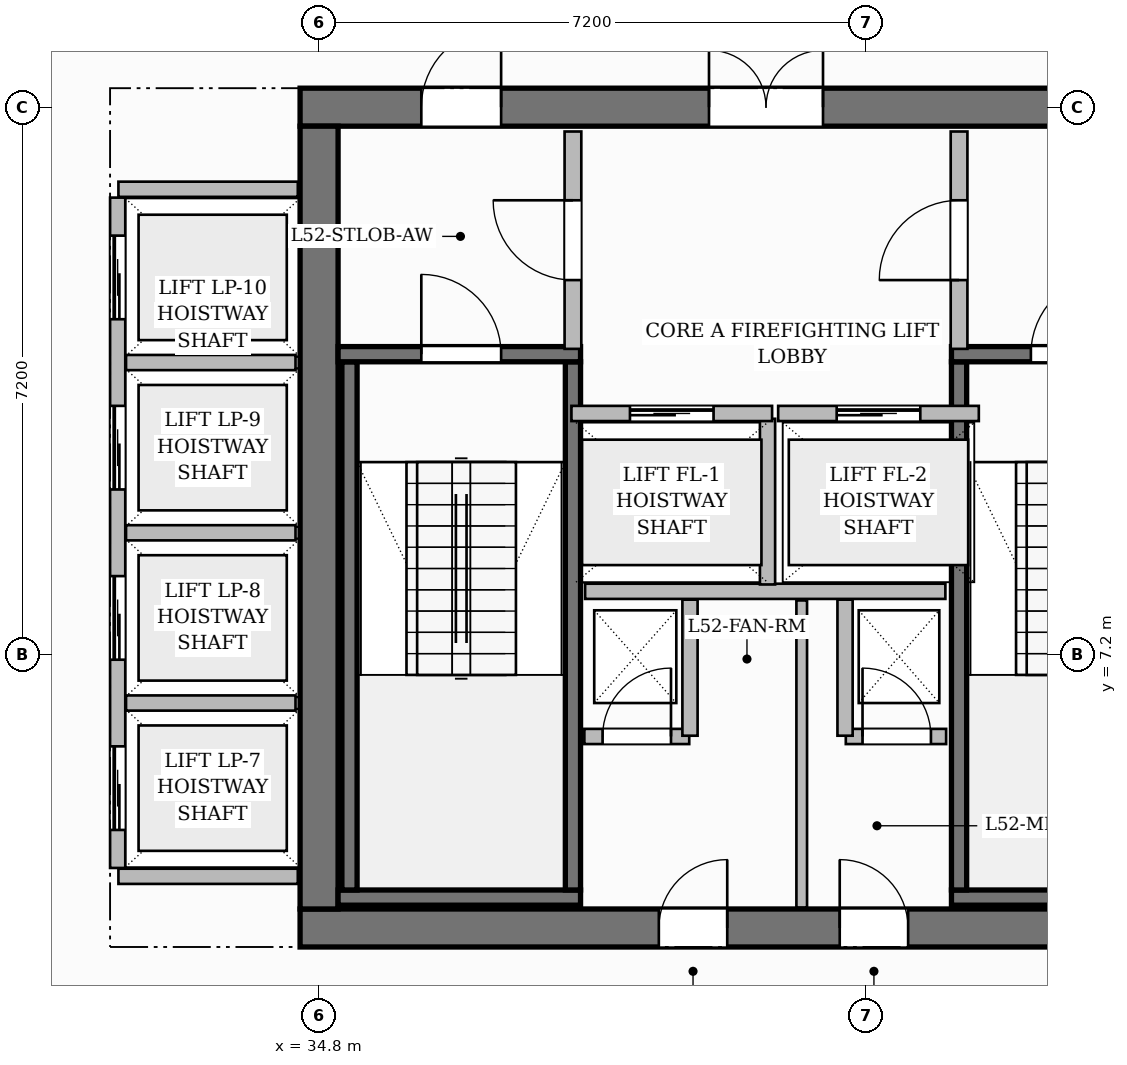
"""IFC4 building model, lengths in metres.
Left out: names, types, materials, properties, quantities, classifications, styles, units other than length and angle.
Written with IfcOpenShell. Run it as: python <this file> out.ifc"""

import sys

from ifc_helpers import new_model, si_unit, direction, frame, frame_2d, origin, place, context, subcontext, project, spatial, rectangle, extrude, source, transform, mapped, element, fill, save


model = new_model("IFC4")
c1 = context("Model", 3, precision=1e-05, world=origin(), true_north=direction((0.0, 1.0)))
c2 = subcontext(c1, "Body", "Model", "MODEL_VIEW")
j1 = project(units=[si_unit("LENGTHUNIT", "METRE"), si_unit("PLANEANGLEUNIT", "RADIAN")], contexts=[c1])
p1 = place(None, origin())
s1 = spatial("IfcSite", under=j1, at=p1, CompositionType="ELEMENT")
p2 = place(p1, origin())
s2 = spatial("IfcBuilding", under=s1, at=p2, CompositionType="ELEMENT")
p3 = place(p2, frame((0.0, 0.0, 209.6)))
s3 = spatial("IfcBuildingStorey", under=s2, at=p3, CompositionType="ELEMENT", Elevation=209.6)
p4 = place(p3, frame((34.55, 3.6, 0.0), z_axis=(0.0, 0.0, 1.0), x_axis=(1.0, 0.0, 0.0)))
e1 = element("IfcWall", 1, at=p4, inside=s3, PredefinedType="SHEAR", context=c2, shape_type="SweptSolid", body=[
    extrude(rectangle(XDim=15.5, YDim=0.5, at=frame_2d((7.75, 0.0))), origin(), (0.0, 0.0, 1.0), 3.85),
])
p5 = place(p4, frame((4.72, 0.0, 0.0)))
e2 = element("IfcOpeningElement", 2, at=p5, cuts=e1, PredefinedType="OPENING", context=c2, shape_type="SweptSolid", body=[
    extrude(rectangle(XDim=0.9, YDim=2.1, at=frame_2d((0.45, 1.05))), frame((0.0, 0.26, 0.0), z_axis=(0.0, -1.0, 0.0), x_axis=(1.0, 0.0, 0.0)), (0.0, 0.0, 1.0), 0.52),
])
p6 = place(p4, frame((7.1, 0.0, 0.0)))
e3 = element("IfcOpeningElement", 3, at=p6, cuts=e1, PredefinedType="OPENING", context=c2, shape_type="SweptSolid", body=[
    extrude(rectangle(XDim=0.9, YDim=2.1, at=frame_2d((0.45, 1.05))), frame((0.0, 0.26, 0.0), z_axis=(0.0, -1.0, 0.0), x_axis=(1.0, 0.0, 0.0)), (0.0, 0.0, 1.0), 0.52),
])
p7 = place(p3, frame((34.55, 14.4, 0.0), z_axis=(0.0, 0.0, 1.0), x_axis=(1.0, 0.0, 0.0)))
e4 = element("IfcWall", 4, at=p7, inside=s3, PredefinedType="SHEAR", context=c2, shape_type="SweptSolid", body=[
    extrude(rectangle(XDim=15.5, YDim=0.5, at=frame_2d((7.75, 0.0))), origin(), (0.0, 0.0, 1.0), 3.85),
])
p8 = place(p7, frame((5.38, 0.0, 0.0)))
e5 = element("IfcOpeningElement", 5, at=p8, cuts=e4, PredefinedType="OPENING", context=c2, shape_type="SweptSolid", body=[
    extrude(rectangle(XDim=1.5, YDim=2.2, at=frame_2d((0.75, 1.1))), frame((0.0, 0.26, 0.0), z_axis=(0.0, -1.0, 0.0), x_axis=(1.0, 0.0, 0.0)), (0.0, 0.0, 1.0), 0.52),
])
p9 = place(p7, frame((1.595, 0.0, 0.0)))
e6 = element("IfcOpeningElement", 6, at=p9, cuts=e4, PredefinedType="OPENING", context=c2, shape_type="SweptSolid", body=[
    extrude(rectangle(XDim=1.05, YDim=2.15, at=frame_2d((0.525, 1.075))), frame((0.0, 0.26, 0.0), z_axis=(0.0, -1.0, 0.0), x_axis=(1.0, 0.0, 0.0)), (0.0, 0.0, 1.0), 0.52),
])
p10 = place(p7, frame((11.225, 0.0, 0.0)))
e7 = element("IfcOpeningElement", 7, at=p10, cuts=e4, PredefinedType="OPENING", context=c2, shape_type="SweptSolid", body=[
    extrude(rectangle(XDim=1.05, YDim=2.15, at=frame_2d((0.525, 1.075))), frame((0.0, 0.26, 0.0), z_axis=(0.0, -1.0, 0.0), x_axis=(1.0, 0.0, 0.0)), (0.0, 0.0, 1.0), 0.52),
])
p11 = place(p3, frame((34.8, 3.85, 0.0), z_axis=(0.0, 0.0, 1.0), x_axis=(0.0, 1.0, 0.0)))
e8 = element("IfcWall", 8, at=p11, inside=s3, PredefinedType="SHEAR", context=c2, shape_type="SweptSolid", body=[
    extrude(rectangle(XDim=10.3, YDim=0.5, at=frame_2d((5.15, 0.0))), origin(), (0.0, 0.0, 1.0), 3.85),
])
p12 = place(p3, frame((35.05, 4.0, 0.0), z_axis=(0.0, 0.0, 1.0), x_axis=(1.0, 0.0, 0.0)))
e9 = element("IfcWall", 9, at=p12, inside=s3, PredefinedType="SHEAR", context=c2, shape_type="SweptSolid", body=[
    extrude(rectangle(XDim=3.19, YDim=0.2, at=frame_2d((1.595, 0.0))), origin(), (0.0, 0.0, 1.0), 3.85),
])
for number, where, z_axis, x_axis in (
    (10, (35.2, 4.1, 0.0), (0.0, 0.0, 1.0), (0.0, 1.0, 0.0)),
    (11, (38.14, 4.1, 0.0), (0.0, 0.0, 1.0), (0.0, 1.0, 0.0)),
):
    element("IfcWall", number, at=place(p3, frame(where, z_axis=z_axis, x_axis=x_axis)), inside=s3, PredefinedType="SHEAR", context=c2, shape_type="SweptSolid", body=[
        extrude(rectangle(XDim=6.95, YDim=0.2, at=frame_2d((3.475, 0.0))), origin(), (0.0, 0.0, 1.0), 3.85),
    ])
p13 = place(p3, frame((35.05, 11.15, 0.0), z_axis=(0.0, 0.0, 1.0), x_axis=(1.0, 0.0, 0.0)))
e12 = element("IfcWall", 12, at=p13, inside=s3, PredefinedType="SHEAR", context=c2, shape_type="SweptSolid", body=[
    extrude(rectangle(XDim=3.19, YDim=0.2, at=frame_2d((1.595, 0.0))), origin(), (0.0, 0.0, 1.0), 3.85),
])
p14 = place(p13, frame((1.095, 0.0, 0.0)))
e13 = element("IfcOpeningElement", 13, at=p14, cuts=e12, PredefinedType="OPENING", context=c2, shape_type="SweptSolid", body=[
    extrude(rectangle(XDim=1.05, YDim=2.2, at=frame_2d((0.525, 1.1))), frame((0.0, 0.11, 0.0), z_axis=(0.0, -1.0, 0.0), x_axis=(1.0, 0.0, 0.0)), (0.0, 0.0, 1.0), 0.22),
])
p15 = place(p3, frame((43.12, 4.0, 0.0), z_axis=(0.0, 0.0, 1.0), x_axis=(1.0, 0.0, 0.0)))
e14 = element("IfcWall", 14, at=p15, inside=s3, PredefinedType="SHEAR", context=c2, shape_type="SweptSolid", body=[
    extrude(rectangle(XDim=6.43, YDim=0.2, at=frame_2d((3.215, 0.0))), origin(), (0.0, 0.0, 1.0), 3.85),
])
p16 = place(p3, frame((43.22, 4.1, 0.0), z_axis=(0.0, 0.0, 1.0), x_axis=(0.0, 1.0, 0.0)))
e15 = element("IfcWall", 15, at=p16, inside=s3, PredefinedType="SHEAR", context=c2, shape_type="SweptSolid", body=[
    extrude(rectangle(XDim=6.95, YDim=0.2, at=frame_2d((3.475, 0.0))), origin(), (0.0, 0.0, 1.0), 3.85),
])
p17 = place(p3, frame((43.12, 11.15, 0.0), z_axis=(0.0, 0.0, 1.0), x_axis=(1.0, 0.0, 0.0)))
e16 = element("IfcWall", 16, at=p17, inside=s3, PredefinedType="SHEAR", context=c2, shape_type="SweptSolid", body=[
    extrude(rectangle(XDim=6.43, YDim=0.2, at=frame_2d((3.215, 0.0))), origin(), (0.0, 0.0, 1.0), 3.85),
])
p18 = place(p17, frame((1.045, 0.0, 0.0)))
e17 = element("IfcOpeningElement", 17, at=p18, cuts=e16, PredefinedType="OPENING", context=c2, shape_type="SweptSolid", body=[
    extrude(rectangle(XDim=1.05, YDim=2.2, at=frame_2d((0.525, 1.1))), frame((0.0, 0.11, 0.0), z_axis=(0.0, -1.0, 0.0), x_axis=(1.0, 0.0, 0.0)), (0.0, 0.0, 1.0), 0.22),
])
p19 = place(p17, frame((4.125, 0.0, 0.0)))
e18 = element("IfcOpeningElement", 18, at=p19, cuts=e16, PredefinedType="OPENING", context=c2, shape_type="SweptSolid", body=[
    extrude(rectangle(XDim=1.05, YDim=2.2, at=frame_2d((0.525, 1.1))), frame((0.0, 0.11, 0.0), z_axis=(0.0, -1.0, 0.0), x_axis=(1.0, 0.0, 0.0)), (0.0, 0.0, 1.0), 0.22),
])
p20 = place(p3, frame((38.3, 8.03, 0.0), z_axis=(0.0, 0.0, 1.0), x_axis=(1.0, 0.0, 0.0)))
e19 = element("IfcWall", 19, at=p20, inside=s3, PredefinedType="PARTITIONING", context=c2, shape_type="SweptSolid", body=[
    extrude(rectangle(XDim=4.74, YDim=0.2, at=frame_2d((2.37, 0.0))), origin(), (0.0, 0.0, 1.0), 3.6),
])
p21 = place(p3, frame((40.7, 8.12, 0.0), z_axis=(0.0, 0.0, 1.0), x_axis=(0.0, 1.0, 0.0)))
e20 = element("IfcWall", 20, at=p21, inside=s3, PredefinedType="PARTITIONING", context=c2, shape_type="SweptSolid", body=[
    extrude(rectangle(XDim=2.18, YDim=0.2, at=frame_2d((1.09, 0.0))), origin(), (0.0, 0.0, 1.0), 3.6),
])
p22 = place(p3, frame((38.14, 11.22, 0.0), z_axis=(0.0, 0.0, 1.0), x_axis=(0.0, 1.0, 0.0)))
e21 = element("IfcWall", 21, at=p22, inside=s3, PredefinedType="PARTITIONING", context=c2, shape_type="SweptSolid", body=[
    extrude(rectangle(XDim=2.86, YDim=0.22, at=frame_2d((1.43, 0.0))), origin(), (0.0, 0.0, 1.0), 3.6),
])
p23 = place(p22, frame((0.905, 0.0, 0.0)))
e22 = element("IfcOpeningElement", 22, at=p23, cuts=e21, PredefinedType="OPENING", context=c2, shape_type="SweptSolid", body=[
    extrude(rectangle(XDim=1.05, YDim=2.15, at=frame_2d((0.525, 1.075))), frame((0.0, 0.12, 0.0), z_axis=(0.0, -1.0, 0.0), x_axis=(1.0, 0.0, 0.0)), (0.0, 0.0, 1.0), 0.24),
])
p24 = place(p3, frame((43.22, 11.22, 0.0), z_axis=(0.0, 0.0, 1.0), x_axis=(0.0, 1.0, 0.0)))
e23 = element("IfcWall", 23, at=p24, inside=s3, PredefinedType="PARTITIONING", context=c2, shape_type="SweptSolid", body=[
    extrude(rectangle(XDim=2.86, YDim=0.22, at=frame_2d((1.43, 0.0))), origin(), (0.0, 0.0, 1.0), 3.6),
])
p25 = place(p24, frame((0.905, 0.0, 0.0)))
e24 = element("IfcOpeningElement", 24, at=p25, cuts=e23, PredefinedType="OPENING", context=c2, shape_type="SweptSolid", body=[
    extrude(rectangle(XDim=1.05, YDim=2.15, at=frame_2d((0.525, 1.075))), frame((0.0, 0.12, 0.0), z_axis=(0.0, -1.0, 0.0), x_axis=(1.0, 0.0, 0.0)), (0.0, 0.0, 1.0), 0.24),
])
p26 = place(p3, frame((38.29, 6.12, 0.0), z_axis=(0.0, 0.0, 1.0), x_axis=(1.0, 0.0, 0.0)))
e25 = element("IfcWall", 25, at=p26, inside=s3, PredefinedType="PARTITIONING", context=c2, shape_type="SweptSolid", body=[
    extrude(rectangle(XDim=1.38, YDim=0.2, at=frame_2d((0.69, 0.0))), origin(), (0.0, 0.0, 1.0), 3.6),
])
p27 = place(p26, frame((0.24, 0.0, 0.0)))
e26 = element("IfcOpeningElement", 26, at=p27, cuts=e25, PredefinedType="OPENING", context=c2, shape_type="SweptSolid", body=[
    extrude(rectangle(XDim=0.9, YDim=2.1, at=frame_2d((0.45, 1.05))), frame((0.0, 0.11, 0.0), z_axis=(0.0, -1.0, 0.0), x_axis=(1.0, 0.0, 0.0)), (0.0, 0.0, 1.0), 0.22),
])
p28 = place(p3, frame((39.68, 6.13, 0.0), z_axis=(0.0, 0.0, 1.0), x_axis=(0.0, 1.0, 0.0)))
e27 = element("IfcWall", 27, at=p28, inside=s3, PredefinedType="PARTITIONING", context=c2, shape_type="SweptSolid", body=[
    extrude(rectangle(XDim=1.79, YDim=0.2, at=frame_2d((0.895, 0.0))), origin(), (0.0, 0.0, 1.0), 3.6),
])
p29 = place(p3, frame((41.73, 6.12, 0.0), z_axis=(0.0, 0.0, 1.0), x_axis=(1.0, 0.0, 0.0)))
e28 = element("IfcWall", 28, at=p29, inside=s3, PredefinedType="PARTITIONING", context=c2, shape_type="SweptSolid", body=[
    extrude(rectangle(XDim=1.32, YDim=0.2, at=frame_2d((0.66, 0.0))), origin(), (0.0, 0.0, 1.0), 3.6),
])
p30 = place(p29, frame((0.22, 0.0, 0.0)))
e29 = element("IfcOpeningElement", 29, at=p30, cuts=e28, PredefinedType="OPENING", context=c2, shape_type="SweptSolid", body=[
    extrude(rectangle(XDim=0.9, YDim=2.1, at=frame_2d((0.45, 1.05))), frame((0.0, 0.11, 0.0), z_axis=(0.0, -1.0, 0.0), x_axis=(1.0, 0.0, 0.0)), (0.0, 0.0, 1.0), 0.22),
])
p31 = place(p3, frame((41.72, 6.13, 0.0), z_axis=(0.0, 0.0, 1.0), x_axis=(0.0, 1.0, 0.0)))
e30 = element("IfcWall", 30, at=p31, inside=s3, PredefinedType="PARTITIONING", context=c2, shape_type="SweptSolid", body=[
    extrude(rectangle(XDim=1.79, YDim=0.2, at=frame_2d((0.895, 0.0))), origin(), (0.0, 0.0, 1.0), 3.6),
])
p32 = place(p3, frame((41.15, 3.87, 0.0), z_axis=(0.0, 0.0, 1.0), x_axis=(0.0, 1.0, 0.0)))
e31 = element("IfcWall", 31, at=p32, inside=s3, PredefinedType="PARTITIONING", context=c2, shape_type="SweptSolid", body=[
    extrude(rectangle(XDim=4.04, YDim=0.14, at=frame_2d((2.02, 0.0))), origin(), (0.0, 0.0, 1.0), 3.6),
])
for number, where, z_axis, x_axis in (
    (32, (32.16, 4.28, 0.0), (0.0, 0.0, 1.0), (1.0, 0.0, 0.0)),
    (33, (32.16, 13.32, 0.0), (0.0, 0.0, 1.0), (1.0, 0.0, 0.0)),
):
    element("IfcWall", number, at=place(p3, frame(where, z_axis=z_axis, x_axis=x_axis)), inside=s3, PredefinedType="PARTITIONING", context=c2, shape_type="SweptSolid", body=[
        extrude(rectangle(XDim=2.36, YDim=0.2, at=frame_2d((1.18, 0.0))), origin(), (0.0, 0.0, 1.0), 3.6),
    ])
p33 = place(p3, frame((32.15, 4.39, 0.0), z_axis=(0.0, 0.0, 1.0), x_axis=(0.0, 1.0, 0.0)))
e34 = element("IfcWall", 34, at=p33, inside=s3, PredefinedType="PARTITIONING", context=c2, shape_type="SweptSolid", body=[
    extrude(rectangle(XDim=8.82, YDim=0.2, at=frame_2d((4.41, 0.0))), origin(), (0.0, 0.0, 1.0), 3.6),
])
p34 = place(p33, frame((0.5, 0.0, 0.0)))
e35 = element("IfcOpeningElement", 35, at=p34, cuts=e34, PredefinedType="OPENING", context=c2, shape_type="SweptSolid", body=[
    extrude(rectangle(XDim=1.1, YDim=2.2, at=frame_2d((0.55, 1.1))), frame((0.0, 0.11, 0.0), z_axis=(0.0, -1.0, 0.0), x_axis=(1.0, 0.0, 0.0)), (0.0, 0.0, 1.0), 0.22),
])
p35 = place(p33, frame((2.74, 0.0, 0.0)))
e36 = element("IfcOpeningElement", 36, at=p35, cuts=e34, PredefinedType="OPENING", context=c2, shape_type="SweptSolid", body=[
    extrude(rectangle(XDim=1.1, YDim=2.2, at=frame_2d((0.55, 1.1))), frame((0.0, 0.11, 0.0), z_axis=(0.0, -1.0, 0.0), x_axis=(1.0, 0.0, 0.0)), (0.0, 0.0, 1.0), 0.22),
])
p36 = place(p33, frame((4.98, 0.0, 0.0)))
e37 = element("IfcOpeningElement", 37, at=p36, cuts=e34, PredefinedType="OPENING", context=c2, shape_type="SweptSolid", body=[
    extrude(rectangle(XDim=1.1, YDim=2.2, at=frame_2d((0.55, 1.1))), frame((0.0, 0.11, 0.0), z_axis=(0.0, -1.0, 0.0), x_axis=(1.0, 0.0, 0.0)), (0.0, 0.0, 1.0), 0.22),
])
p37 = place(p33, frame((7.22, 0.0, 0.0)))
e38 = element("IfcOpeningElement", 38, at=p37, cuts=e34, PredefinedType="OPENING", context=c2, shape_type="SweptSolid", body=[
    extrude(rectangle(XDim=1.1, YDim=2.2, at=frame_2d((0.55, 1.1))), frame((0.0, 0.11, 0.0), z_axis=(0.0, -1.0, 0.0), x_axis=(1.0, 0.0, 0.0)), (0.0, 0.0, 1.0), 0.22),
])
for number, where, z_axis, x_axis in (
    (39, (32.26, 6.56, 0.0), (0.0, 0.0, 1.0), (1.0, 0.0, 0.0)),
    (40, (32.26, 8.8, 0.0), (0.0, 0.0, 1.0), (1.0, 0.0, 0.0)),
    (41, (32.26, 11.04, 0.0), (0.0, 0.0, 1.0), (1.0, 0.0, 0.0)),
):
    element("IfcWall", number, at=place(p3, frame(where, z_axis=z_axis, x_axis=x_axis)), inside=s3, PredefinedType="PARTITIONING", context=c2, shape_type="SweptSolid", body=[
        extrude(rectangle(XDim=2.23, YDim=0.2, at=frame_2d((1.115, 0.0))), origin(), (0.0, 0.0, 1.0), 3.6),
    ])
p38 = place(p3, frame((38.12, 10.37, 0.0), z_axis=(0.0, 0.0, 1.0), x_axis=(1.0, 0.0, 0.0)))
e42 = element("IfcWall", 42, at=p38, inside=s3, PredefinedType="PARTITIONING", context=c2, shape_type="SweptSolid", body=[
    extrude(rectangle(XDim=2.64, YDim=0.2, at=frame_2d((1.32, 0.0))), origin(), (0.0, 0.0, 1.0), 3.6),
])
p39 = place(p38, frame((0.77, 0.0, 0.0)))
e43 = element("IfcOpeningElement", 43, at=p39, cuts=e42, PredefinedType="OPENING", context=c2, shape_type="SweptSolid", body=[
    extrude(rectangle(XDim=1.1, YDim=2.2, at=frame_2d((0.55, 1.1))), frame((0.0, 0.11, 0.0), z_axis=(0.0, -1.0, 0.0), x_axis=(1.0, 0.0, 0.0)), (0.0, 0.0, 1.0), 0.22),
])
p40 = place(p3, frame((40.84, 10.37, 0.0), z_axis=(0.0, 0.0, 1.0), x_axis=(1.0, 0.0, 0.0)))
e44 = element("IfcWall", 44, at=p40, inside=s3, PredefinedType="PARTITIONING", context=c2, shape_type="SweptSolid", body=[
    extrude(rectangle(XDim=2.64, YDim=0.2, at=frame_2d((1.32, 0.0))), origin(), (0.0, 0.0, 1.0), 3.6),
])
p41 = place(p40, frame((0.77, 0.0, 0.0)))
e45 = element("IfcOpeningElement", 45, at=p41, cuts=e44, PredefinedType="OPENING", context=c2, shape_type="SweptSolid", body=[
    extrude(rectangle(XDim=1.1, YDim=2.2, at=frame_2d((0.55, 1.1))), frame((0.0, 0.11, 0.0), z_axis=(0.0, -1.0, 0.0), x_axis=(1.0, 0.0, 0.0)), (0.0, 0.0, 1.0), 0.22),
])
m1 = source(origin(), c2, "Body", "SweptSolid", [
    extrude(rectangle(XDim=1.05, YDim=2.2, at=frame_2d((0.525, 1.1))), frame((0.0, 0.025, 0.0), z_axis=(0.0, -1.0, 0.0), x_axis=(1.0, 0.0, 0.0)), (0.0, 0.0, 1.0), 0.05),
])
p42 = place(p14, origin())
e46 = element("IfcDoor", 46, at=p42, inside=s3, OperationType="SINGLE_SWING_LEFT", PredefinedType="DOOR", context=c2, shape_type="MappedRepresentation", body=[
    mapped(m1, transform((0.0, 0.0, 0.0), scale=1.0)),
])
fill(e13, e46)
p43 = place(p18, origin())
e47 = element("IfcDoor", 47, at=p43, inside=s3, OperationType="SINGLE_SWING_RIGHT", PredefinedType="DOOR", context=c2, shape_type="MappedRepresentation", body=[
    mapped(m1, transform((0.0, 0.0, 0.0), scale=1.0)),
])
fill(e17, e47)
m2 = source(origin(), c2, "Body", "SweptSolid", [
    extrude(rectangle(XDim=1.05, YDim=2.15, at=frame_2d((0.525, 1.075))), frame((0.0, 0.025, 0.0), z_axis=(0.0, -1.0, 0.0), x_axis=(1.0, 0.0, 0.0)), (0.0, 0.0, 1.0), 0.05),
])
p44 = place(p23, origin())
e48 = element("IfcDoor", 48, at=p44, inside=s3, OperationType="SINGLE_SWING_RIGHT", PredefinedType="DOOR", context=c2, shape_type="MappedRepresentation", body=[
    mapped(m2, transform((0.0, 0.0, 0.0), scale=1.0)),
])
fill(e22, e48)
p45 = place(p25, origin())
e49 = element("IfcDoor", 49, at=p45, inside=s3, OperationType="SINGLE_SWING_LEFT", PredefinedType="DOOR", context=c2, shape_type="MappedRepresentation", body=[
    mapped(m2, transform((0.0, 0.0, 0.0), scale=1.0)),
])
fill(e24, e49)
m3 = source(origin(), c2, "Body", "SweptSolid", [
    extrude(rectangle(XDim=1.5, YDim=2.2, at=frame_2d((0.75, 1.1))), frame((0.0, 0.025, 0.0), z_axis=(0.0, -1.0, 0.0), x_axis=(1.0, 0.0, 0.0)), (0.0, 0.0, 1.0), 0.05),
])
p46 = place(p8, origin())
e50 = element("IfcDoor", 50, at=p46, inside=s3, OperationType="DOUBLE_DOOR_SINGLE_SWING", PredefinedType="DOOR", context=c2, shape_type="MappedRepresentation", body=[
    mapped(m3, transform((0.0, 0.0, 0.0), scale=1.0)),
])
fill(e5, e50)
p47 = place(p9, origin())
e51 = element("IfcDoor", 51, at=p47, inside=s3, OperationType="SINGLE_SWING_RIGHT", PredefinedType="DOOR", context=c2, shape_type="MappedRepresentation", body=[
    mapped(m2, transform((0.0, 0.0, 0.0), scale=1.0)),
])
fill(e6, e51)
m4 = source(origin(), c2, "Body", "SweptSolid", [
    extrude(rectangle(XDim=0.9, YDim=2.1, at=frame_2d((0.45, 1.05))), frame((0.0, 0.025, 0.0), z_axis=(0.0, -1.0, 0.0), x_axis=(1.0, 0.0, 0.0)), (0.0, 0.0, 1.0), 0.05),
])
p48 = place(p27, origin())
e52 = element("IfcDoor", 52, at=p48, inside=s3, OperationType="SINGLE_SWING_RIGHT", PredefinedType="DOOR", context=c2, shape_type="MappedRepresentation", body=[
    mapped(m4, transform((0.0, 0.0, 0.0), scale=1.0)),
])
fill(e26, e52)
p49 = place(p30, origin())
e53 = element("IfcDoor", 53, at=p49, inside=s3, OperationType="SINGLE_SWING_LEFT", PredefinedType="DOOR", context=c2, shape_type="MappedRepresentation", body=[
    mapped(m4, transform((0.0, 0.0, 0.0), scale=1.0)),
])
fill(e29, e53)
p50 = place(p5, origin())
e54 = element("IfcDoor", 54, at=p50, inside=s3, OperationType="SINGLE_SWING_RIGHT", PredefinedType="DOOR", context=c2, shape_type="MappedRepresentation", body=[
    mapped(m4, transform((0.0, 0.0, 0.0), scale=1.0)),
])
fill(e2, e54)
p51 = place(p6, origin())
e55 = element("IfcDoor", 55, at=p51, inside=s3, OperationType="SINGLE_SWING_LEFT", PredefinedType="DOOR", context=c2, shape_type="MappedRepresentation", body=[
    mapped(m4, transform((0.0, 0.0, 0.0), scale=1.0)),
])
fill(e3, e55)
m5 = source(origin(), c2, "Body", "SweptSolid", [
    extrude(rectangle(XDim=1.1, YDim=2.2, at=frame_2d((0.55, 1.1))), frame((0.0, 0.025, 0.0), z_axis=(0.0, -1.0, 0.0), x_axis=(1.0, 0.0, 0.0)), (0.0, 0.0, 1.0), 0.05),
])
p52 = place(p39, origin())
e56 = element("IfcDoor", 56, at=p52, inside=s3, OperationType="SLIDING_TO_LEFT", PredefinedType="DOOR", context=c2, shape_type="MappedRepresentation", body=[
    mapped(m5, transform((0.0, 0.0, 0.0), scale=1.0)),
])
fill(e43, e56)
p53 = place(p41, origin())
e57 = element("IfcDoor", 57, at=p53, inside=s3, OperationType="SLIDING_TO_LEFT", PredefinedType="DOOR", context=c2, shape_type="MappedRepresentation", body=[
    mapped(m5, transform((0.0, 0.0, 0.0), scale=1.0)),
])
fill(e45, e57)
p54 = place(p34, origin())
e58 = element("IfcDoor", 58, at=p54, inside=s3, OperationType="SLIDING_TO_LEFT", PredefinedType="DOOR", context=c2, shape_type="MappedRepresentation", body=[
    mapped(m5, transform((0.0, 0.0, 0.0), scale=1.0)),
])
fill(e35, e58)
p55 = place(p35, origin())
e59 = element("IfcDoor", 59, at=p55, inside=s3, OperationType="SLIDING_TO_LEFT", PredefinedType="DOOR", context=c2, shape_type="MappedRepresentation", body=[
    mapped(m5, transform((0.0, 0.0, 0.0), scale=1.0)),
])
fill(e36, e59)
p56 = place(p36, origin())
e60 = element("IfcDoor", 60, at=p56, inside=s3, OperationType="SLIDING_TO_LEFT", PredefinedType="DOOR", context=c2, shape_type="MappedRepresentation", body=[
    mapped(m5, transform((0.0, 0.0, 0.0), scale=1.0)),
])
fill(e37, e60)
p57 = place(p37, origin())
e61 = element("IfcDoor", 61, at=p57, inside=s3, OperationType="SLIDING_TO_LEFT", PredefinedType="DOOR", context=c2, shape_type="MappedRepresentation", body=[
    mapped(m5, transform((0.0, 0.0, 0.0), scale=1.0)),
])
fill(e38, e61)
save(model, sys.argv[1])
